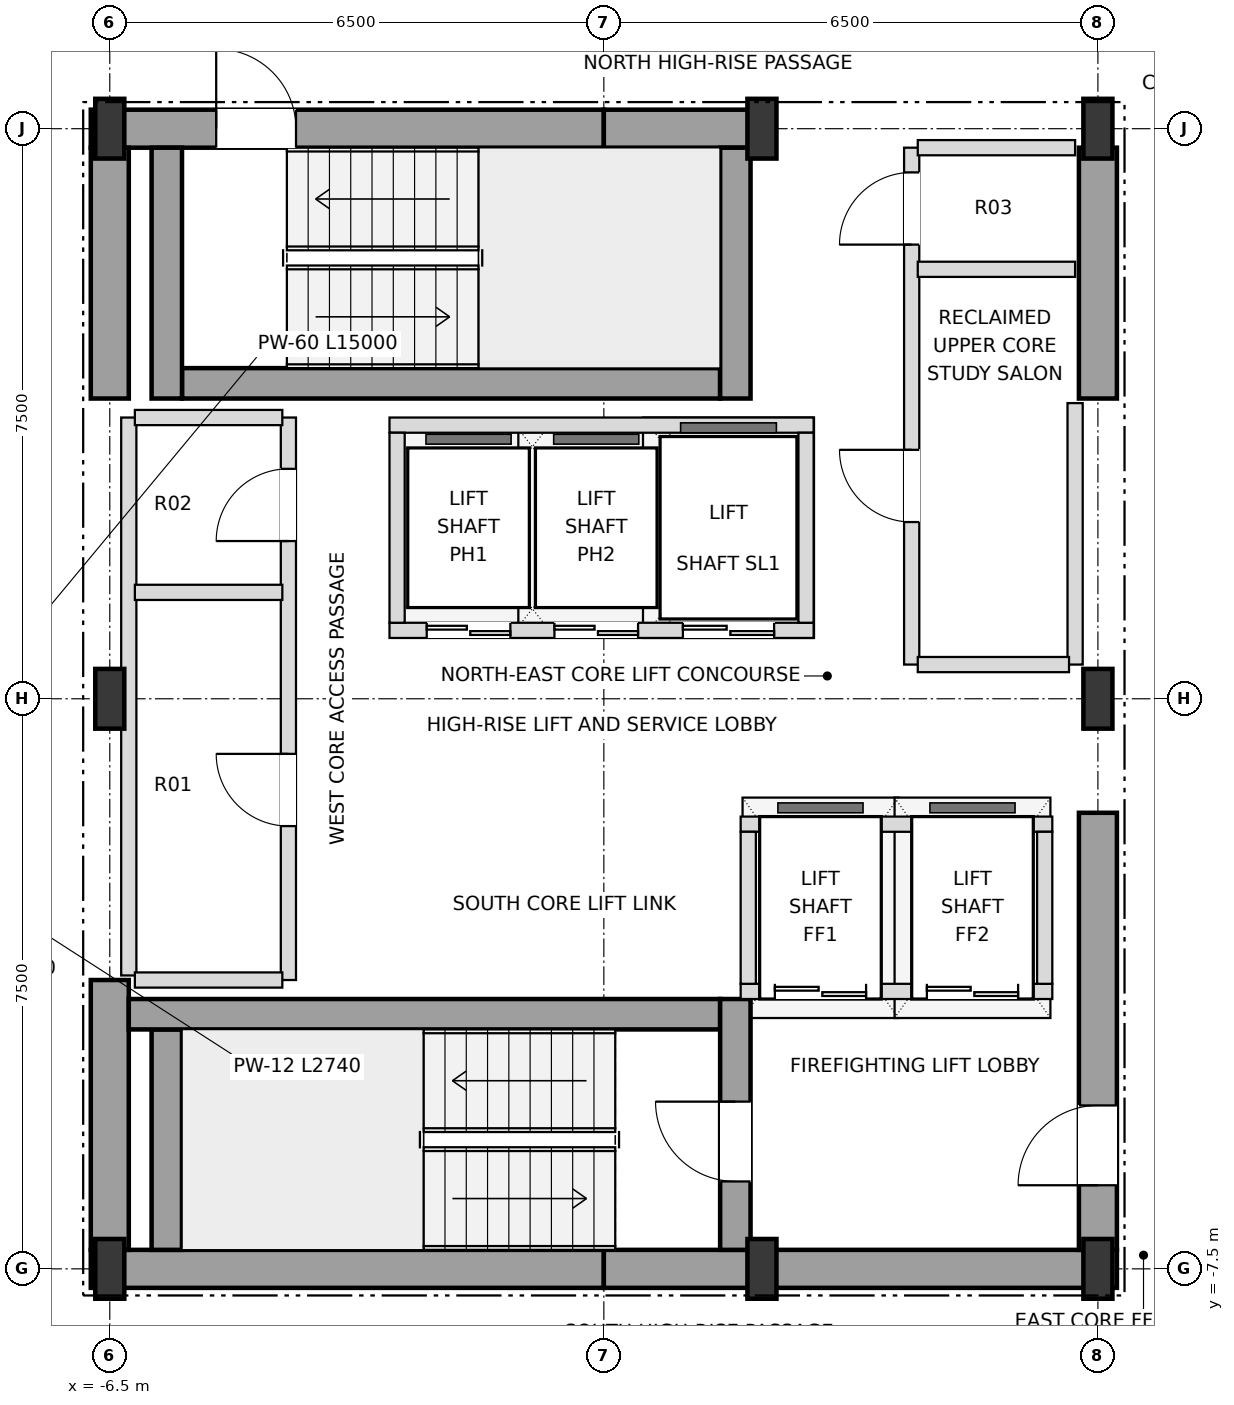
"""IFC4 building model, lengths in metres.
Left out: names, types, materials, properties, quantities, classifications, styles, units other than length and angle.
Written with IfcOpenShell. Run it as: python <this file> out.ifc"""

import sys

from ifc_helpers import new_model, si_unit, direction, frame, frame_2d, origin, origin_2d, place, context, subcontext, project, spatial, rectangle, i_section, extrude, element, fill, save


model = new_model("IFC4")
c1 = context("Model", 3, precision=1e-05, world=origin(), true_north=direction((0.0, 1.0)))
c2 = subcontext(c1, "Body", "Model", "MODEL_VIEW")
j1 = project(units=[si_unit("LENGTHUNIT", "METRE"), si_unit("PLANEANGLEUNIT", "RADIAN")], contexts=[c1])
p1 = place(None, origin())
s1 = spatial("IfcSite", under=j1, at=p1, CompositionType="ELEMENT")
p2 = place(p1, origin())
s2 = spatial("IfcBuilding", under=s1, at=p2, CompositionType="ELEMENT")
p3 = place(p2, frame((0.0, 0.0, 290.7)))
s3 = spatial("IfcBuildingStorey", under=s2, at=p3, CompositionType="ELEMENT", Elevation=290.7)
for number, where, z_axis, x_axis in (
    (1, (-6.5, -7.5, 0.0), (0.0, 0.0, 1.0), (1.0, 0.0, 0.0)),
    (2, (2.08, -7.5, 0.0), (0.0, 0.0, 1.0), (1.0, 0.0, 0.0)),
    (3, (6.5, -7.5, 0.0), (0.0, 0.0, 1.0), (1.0, 0.0, 0.0)),
    (4, (-6.5, 0.0, 0.0), (0.0, 0.0, 1.0), (1.0, 0.0, 0.0)),
    (5, (6.5, 0.0, 0.0), (0.0, 0.0, 1.0), (1.0, 0.0, 0.0)),
    (6, (-6.5, 7.5, 0.0), (0.0, 0.0, 1.0), (1.0, 0.0, 0.0)),
    (7, (2.08, 7.5, 0.0), (0.0, 0.0, 1.0), (1.0, 0.0, 0.0)),
    (8, (6.5, 7.5, 0.0), (0.0, 0.0, 1.0), (1.0, 0.0, 0.0)),
):
    element("IfcColumn", number, at=place(p3, frame(where, z_axis=z_axis, x_axis=x_axis)), inside=s3, PredefinedType="COLUMN", context=c2, shape_type="SweptSolid", body=[
        extrude(i_section(OverallWidth=0.382, OverallDepth=0.786, WebThickness=0.02, FlangeThickness=0.033, at=origin_2d()), origin(), (0.0, 0.0, 1.0), 3.6),
    ])
for number, where, z_axis, x_axis in (
    (9, (-6.75, -7.5, 0.0), (0.0, 0.0, 1.0), (1.0, 0.0, 0.0)),
    (10, (0.0, -7.5, 0.0), (0.0, 0.0, 1.0), (1.0, 0.0, 0.0)),
):
    element("IfcWall", number, at=place(p3, frame(where, z_axis=z_axis, x_axis=x_axis)), inside=s3, PredefinedType="SHEAR", context=c2, shape_type="SweptSolid", body=[
        extrude(rectangle(XDim=6.75, YDim=0.5, at=frame_2d((3.375, 0.0))), origin(), (0.0, 0.0, 1.0), 3.38),
    ])
p4 = place(p3, frame((-6.75, 7.5, 0.0), z_axis=(0.0, 0.0, 1.0), x_axis=(1.0, 0.0, 0.0)))
e11 = element("IfcWall", 11, at=p4, inside=s3, PredefinedType="SHEAR", context=c2, shape_type="SweptSolid", body=[
    extrude(rectangle(XDim=6.75, YDim=0.5, at=frame_2d((3.375, 0.0))), origin(), (0.0, 0.0, 1.0), 3.38),
])
p5 = place(p4, frame((1.65, 0.0, 0.0)))
e12 = element("IfcOpeningElement", 12, at=p5, cuts=e11, PredefinedType="OPENING", context=c2, shape_type="SweptSolid", body=[
    extrude(rectangle(XDim=1.05, YDim=2.15, at=frame_2d((0.525, 1.075))), frame((0.0, 0.26, 0.0), z_axis=(0.0, -1.0, 0.0), x_axis=(1.0, 0.0, 0.0)), (0.0, 0.0, 1.0), 0.52),
])
p6 = place(p3, frame((0.0, 7.5, 0.0), z_axis=(0.0, 0.0, 1.0), x_axis=(1.0, 0.0, 0.0)))
e13 = element("IfcWall", 13, at=p6, inside=s3, PredefinedType="SHEAR", context=c2, shape_type="SweptSolid", body=[
    extrude(rectangle(XDim=2.08, YDim=0.5, at=frame_2d((1.04, 0.0))), origin(), (0.0, 0.0, 1.0), 3.38),
])
p7 = place(p3, frame((-6.5, -7.25, 0.0), z_axis=(0.0, 0.0, 1.0), x_axis=(0.0, 1.0, 0.0)))
e14 = element("IfcWall", 14, at=p7, inside=s3, PredefinedType="SHEAR", context=c2, shape_type="SweptSolid", body=[
    extrude(rectangle(XDim=3.55, YDim=0.5, at=frame_2d((1.775, 0.0))), origin(), (0.0, 0.0, 1.0), 3.38),
])
p8 = place(p3, frame((-6.5, 3.95, 0.0), z_axis=(0.0, 0.0, 1.0), x_axis=(0.0, 1.0, 0.0)))
e15 = element("IfcWall", 15, at=p8, inside=s3, PredefinedType="SHEAR", context=c2, shape_type="SweptSolid", body=[
    extrude(rectangle(XDim=3.3, YDim=0.5, at=frame_2d((1.65, 0.0))), origin(), (0.0, 0.0, 1.0), 3.38),
])
p9 = place(p3, frame((6.5, -7.25, 0.0), z_axis=(0.0, 0.0, 1.0), x_axis=(0.0, 1.0, 0.0)))
e16 = element("IfcWall", 16, at=p9, inside=s3, PredefinedType="SHEAR", context=c2, shape_type="SweptSolid", body=[
    extrude(rectangle(XDim=5.75, YDim=0.5, at=frame_2d((2.875, 0.0))), origin(), (0.0, 0.0, 1.0), 3.38),
])
p10 = place(p9, frame((0.85, 0.0, 0.0)))
e17 = element("IfcOpeningElement", 17, at=p10, cuts=e16, PredefinedType="OPENING", context=c2, shape_type="SweptSolid", body=[
    extrude(rectangle(XDim=1.05, YDim=2.15, at=frame_2d((0.525, 1.075))), frame((0.0, 0.26, 0.0), z_axis=(0.0, -1.0, 0.0), x_axis=(1.0, 0.0, 0.0)), (0.0, 0.0, 1.0), 0.52),
])
p11 = place(p3, frame((6.5, 3.95, 0.0), z_axis=(0.0, 0.0, 1.0), x_axis=(0.0, 1.0, 0.0)))
e18 = element("IfcWall", 18, at=p11, inside=s3, PredefinedType="SHEAR", context=c2, shape_type="SweptSolid", body=[
    extrude(rectangle(XDim=3.3, YDim=0.5, at=frame_2d((1.65, 0.0))), origin(), (0.0, 0.0, 1.0), 3.38),
])
p12 = place(p3, frame((-5.75, -7.25, 0.0), z_axis=(0.0, 0.0, 1.0), x_axis=(0.0, 1.0, 0.0)))
e19 = element("IfcWall", 19, at=p12, inside=s3, PredefinedType="SHEAR", context=c2, shape_type="SweptSolid", body=[
    extrude(rectangle(XDim=2.9, YDim=0.4, at=frame_2d((1.45, 0.0))), origin(), (0.0, 0.0, 1.0), 3.38),
])
p13 = place(p3, frame((-6.25, -4.15, 0.0), z_axis=(0.0, 0.0, 1.0), x_axis=(1.0, 0.0, 0.0)))
e20 = element("IfcWall", 20, at=p13, inside=s3, PredefinedType="SHEAR", context=c2, shape_type="SweptSolid", body=[
    extrude(rectangle(XDim=7.78, YDim=0.4, at=frame_2d((3.89, 0.0))), origin(), (0.0, 0.0, 1.0), 3.38),
])
p14 = place(p3, frame((1.73, -7.25, 0.0), z_axis=(0.0, 0.0, 1.0), x_axis=(0.0, 1.0, 0.0)))
e21 = element("IfcWall", 21, at=p14, inside=s3, PredefinedType="SHEAR", context=c2, shape_type="SweptSolid", body=[
    extrude(rectangle(XDim=3.3, YDim=0.4, at=frame_2d((1.65, 0.0))), origin(), (0.0, 0.0, 1.0), 3.38),
])
p15 = place(p14, frame((0.9, 0.0, 0.0)))
e22 = element("IfcOpeningElement", 22, at=p15, cuts=e21, PredefinedType="OPENING", context=c2, shape_type="SweptSolid", body=[
    extrude(rectangle(XDim=1.05, YDim=2.15, at=frame_2d((0.525, 1.075))), frame((0.0, 0.21, 0.0), z_axis=(0.0, -1.0, 0.0), x_axis=(1.0, 0.0, 0.0)), (0.0, 0.0, 1.0), 0.42),
])
p16 = place(p3, frame((-5.55, 4.15, 0.0), z_axis=(0.0, 0.0, 1.0), x_axis=(1.0, 0.0, 0.0)))
e23 = element("IfcWall", 23, at=p16, inside=s3, PredefinedType="SHEAR", context=c2, shape_type="SweptSolid", body=[
    extrude(rectangle(XDim=7.08, YDim=0.4, at=frame_2d((3.54, 0.0))), origin(), (0.0, 0.0, 1.0), 3.38),
])
for number, where, z_axis, x_axis in (
    (24, (1.73, 3.95, 0.0), (0.0, 0.0, 1.0), (0.0, 1.0, 0.0)),
    (25, (-5.75, 3.95, 0.0), (0.0, 0.0, 1.0), (0.0, 1.0, 0.0)),
):
    element("IfcWall", number, at=place(p3, frame(where, z_axis=z_axis, x_axis=x_axis)), inside=s3, PredefinedType="SHEAR", context=c2, shape_type="SweptSolid", body=[
        extrude(rectangle(XDim=3.3, YDim=0.4, at=frame_2d((1.65, 0.0))), origin(), (0.0, 0.0, 1.0), 3.38),
    ])
p17 = place(p3, frame((-2.82, 0.9, 0.0), z_axis=(0.0, 0.0, 1.0), x_axis=(1.0, 0.0, 0.0)))
e26 = element("IfcWall", 26, at=p17, inside=s3, PredefinedType="SOLIDWALL", context=c2, shape_type="SweptSolid", body=[
    extrude(rectangle(XDim=5.58, YDim=0.2, at=frame_2d((2.79, 0.0))), origin(), (0.0, 0.0, 1.0), 3.38),
])
p18 = place(p17, frame((0.49, 0.0, 0.0)))
e27 = element("IfcOpeningElement", 27, at=p18, cuts=e26, PredefinedType="OPENING", context=c2, shape_type="SweptSolid", body=[
    extrude(rectangle(XDim=1.1, YDim=2.15, at=frame_2d((0.55, 1.075))), frame((0.0, 0.11, 0.0), z_axis=(0.0, -1.0, 0.0), x_axis=(1.0, 0.0, 0.0)), (0.0, 0.0, 1.0), 0.22),
])
p19 = place(p17, frame((2.17, 0.0, 0.0)))
e28 = element("IfcOpeningElement", 28, at=p19, cuts=e26, PredefinedType="OPENING", context=c2, shape_type="SweptSolid", body=[
    extrude(rectangle(XDim=1.1, YDim=2.15, at=frame_2d((0.55, 1.075))), frame((0.0, 0.11, 0.0), z_axis=(0.0, -1.0, 0.0), x_axis=(1.0, 0.0, 0.0)), (0.0, 0.0, 1.0), 0.22),
])
p20 = place(p17, frame((3.86, 0.0, 0.0)))
e29 = element("IfcOpeningElement", 29, at=p20, cuts=e26, PredefinedType="OPENING", context=c2, shape_type="SweptSolid", body=[
    extrude(rectangle(XDim=1.2, YDim=2.2, at=frame_2d((0.6, 1.1))), frame((0.0, 0.11, 0.0), z_axis=(0.0, -1.0, 0.0), x_axis=(1.0, 0.0, 0.0)), (0.0, 0.0, 1.0), 0.22),
])
p21 = place(p3, frame((-2.82, 3.6, 0.0), z_axis=(0.0, 0.0, 1.0), x_axis=(1.0, 0.0, 0.0)))
e30 = element("IfcWall", 30, at=p21, inside=s3, PredefinedType="SOLIDWALL", context=c2, shape_type="SweptSolid", body=[
    extrude(rectangle(XDim=5.58, YDim=0.2, at=frame_2d((2.79, 0.0))), origin(), (0.0, 0.0, 1.0), 3.38),
])
for number, where, z_axis, x_axis in (
    (31, (-2.72, 1.0, 0.0), (0.0, 0.0, 1.0), (0.0, 1.0, 0.0)),
    (32, (2.66, 1.0, 0.0), (0.0, 0.0, 1.0), (0.0, 1.0, 0.0)),
):
    element("IfcWall", number, at=place(p3, frame(where, z_axis=z_axis, x_axis=x_axis)), inside=s3, PredefinedType="SOLIDWALL", context=c2, shape_type="SweptSolid", body=[
        extrude(rectangle(XDim=2.5, YDim=0.2, at=frame_2d((1.25, 0.0))), origin(), (0.0, 0.0, 1.0), 3.38),
    ])
p22 = place(p3, frame((1.8, -3.85, 0.0), z_axis=(0.0, 0.0, 1.0), x_axis=(1.0, 0.0, 0.0)))
e33 = element("IfcWall", 33, at=p22, inside=s3, PredefinedType="SOLIDWALL", context=c2, shape_type="SweptSolid", body=[
    extrude(rectangle(XDim=4.1, YDim=0.2, at=frame_2d((2.05, 0.0))), origin(), (0.0, 0.0, 1.0), 3.38),
])
p23 = place(p22, frame((0.45, 0.0, 0.0)))
e34 = element("IfcOpeningElement", 34, at=p23, cuts=e33, PredefinedType="OPENING", context=c2, shape_type="SweptSolid", body=[
    extrude(rectangle(XDim=1.2, YDim=2.2, at=frame_2d((0.6, 1.1))), frame((0.0, 0.11, 0.0), z_axis=(0.0, -1.0, 0.0), x_axis=(1.0, 0.0, 0.0)), (0.0, 0.0, 1.0), 0.22),
])
p24 = place(p22, frame((2.45, 0.0, 0.0)))
e35 = element("IfcOpeningElement", 35, at=p24, cuts=e33, PredefinedType="OPENING", context=c2, shape_type="SweptSolid", body=[
    extrude(rectangle(XDim=1.2, YDim=2.2, at=frame_2d((0.6, 1.1))), frame((0.0, 0.11, 0.0), z_axis=(0.0, -1.0, 0.0), x_axis=(1.0, 0.0, 0.0)), (0.0, 0.0, 1.0), 0.22),
])
p25 = place(p3, frame((1.8, -1.65, 0.0), z_axis=(0.0, 0.0, 1.0), x_axis=(1.0, 0.0, 0.0)))
e36 = element("IfcWall", 36, at=p25, inside=s3, PredefinedType="SOLIDWALL", context=c2, shape_type="SweptSolid", body=[
    extrude(rectangle(XDim=4.1, YDim=0.2, at=frame_2d((2.05, 0.0))), origin(), (0.0, 0.0, 1.0), 3.38),
])
for number, where, z_axis, x_axis in (
    (37, (1.9, -3.75, 0.0), (0.0, 0.0, 1.0), (0.0, 1.0, 0.0)),
    (38, (5.8, -3.75, 0.0), (0.0, 0.0, 1.0), (0.0, 1.0, 0.0)),
):
    element("IfcWall", number, at=place(p3, frame(where, z_axis=z_axis, x_axis=x_axis)), inside=s3, PredefinedType="SOLIDWALL", context=c2, shape_type="SweptSolid", body=[
        extrude(rectangle(XDim=2.0, YDim=0.2, at=frame_2d((1.0, 0.0))), origin(), (0.0, 0.0, 1.0), 3.38),
    ])
p26 = place(p3, frame((-6.25, -3.64, 0.0), z_axis=(0.0, 0.0, 1.0), x_axis=(0.0, 1.0, 0.0)))
e39 = element("IfcWall", 39, at=p26, inside=s3, PredefinedType="SOLIDWALL", context=c2, shape_type="SweptSolid", body=[
    extrude(rectangle(XDim=7.34, YDim=0.2, at=frame_2d((3.67, 0.0))), origin(), (0.0, 0.0, 1.0), 3.38),
])
p27 = place(p3, frame((-4.15, -3.7, 0.0), z_axis=(0.0, 0.0, 1.0), x_axis=(0.0, 1.0, 0.0)))
e40 = element("IfcWall", 40, at=p27, inside=s3, PredefinedType="SOLIDWALL", context=c2, shape_type="SweptSolid", body=[
    extrude(rectangle(XDim=7.4, YDim=0.2, at=frame_2d((3.7, 0.0))), origin(), (0.0, 0.0, 1.0), 3.38),
])
p28 = place(p27, frame((2.025, 0.0, 0.0)))
e41 = element("IfcOpeningElement", 41, at=p28, cuts=e40, PredefinedType="OPENING", context=c2, shape_type="SweptSolid", body=[
    extrude(rectangle(XDim=0.95, YDim=2.15, at=frame_2d((0.475, 1.075))), frame((0.0, 0.11, 0.0), z_axis=(0.0, -1.0, 0.0), x_axis=(1.0, 0.0, 0.0)), (0.0, 0.0, 1.0), 0.22),
])
p29 = place(p27, frame((5.775, 0.0, 0.0)))
e42 = element("IfcOpeningElement", 42, at=p29, cuts=e40, PredefinedType="OPENING", context=c2, shape_type="SweptSolid", body=[
    extrude(rectangle(XDim=0.95, YDim=2.15, at=frame_2d((0.475, 1.075))), frame((0.0, 0.11, 0.0), z_axis=(0.0, -1.0, 0.0), x_axis=(1.0, 0.0, 0.0)), (0.0, 0.0, 1.0), 0.22),
])
p30 = place(p3, frame((4.05, 0.45, 0.0), z_axis=(0.0, 0.0, 1.0), x_axis=(0.0, 1.0, 0.0)))
e43 = element("IfcWall", 43, at=p30, inside=s3, PredefinedType="SOLIDWALL", context=c2, shape_type="SweptSolid", body=[
    extrude(rectangle(XDim=6.8, YDim=0.2, at=frame_2d((3.4, 0.0))), origin(), (0.0, 0.0, 1.0), 3.38),
])
p31 = place(p30, frame((1.875, 0.0, 0.0)))
e44 = element("IfcOpeningElement", 44, at=p31, cuts=e43, PredefinedType="OPENING", context=c2, shape_type="SweptSolid", body=[
    extrude(rectangle(XDim=0.95, YDim=2.15, at=frame_2d((0.475, 1.075))), frame((0.0, 0.11, 0.0), z_axis=(0.0, -1.0, 0.0), x_axis=(1.0, 0.0, 0.0)), (0.0, 0.0, 1.0), 0.22),
])
p32 = place(p30, frame((5.525, 0.0, 0.0)))
e45 = element("IfcOpeningElement", 45, at=p32, cuts=e43, PredefinedType="OPENING", context=c2, shape_type="SweptSolid", body=[
    extrude(rectangle(XDim=0.95, YDim=2.15, at=frame_2d((0.475, 1.075))), frame((0.0, 0.11, 0.0), z_axis=(0.0, -1.0, 0.0), x_axis=(1.0, 0.0, 0.0)), (0.0, 0.0, 1.0), 0.22),
])
p33 = place(p3, frame((6.2, 0.45, 0.0), z_axis=(0.0, 0.0, 1.0), x_axis=(0.0, 1.0, 0.0)))
e46 = element("IfcWall", 46, at=p33, inside=s3, PredefinedType="SOLIDWALL", context=c2, shape_type="SweptSolid", body=[
    extrude(rectangle(XDim=3.44, YDim=0.2, at=frame_2d((1.72, 0.0))), origin(), (0.0, 0.0, 1.0), 3.38),
])
p34 = place(p3, frame((-6.17, -3.7, 0.0), z_axis=(0.0, 0.0, 1.0), x_axis=(1.0, 0.0, 0.0)))
e47 = element("IfcWall", 47, at=p34, inside=s3, PredefinedType="SOLIDWALL", context=c2, shape_type="SweptSolid", body=[
    extrude(rectangle(XDim=1.94, YDim=0.2, at=frame_2d((0.97, 0.0))), origin(), (0.0, 0.0, 1.0), 3.38),
])
p35 = place(p3, frame((4.13, 0.45, 0.0), z_axis=(0.0, 0.0, 1.0), x_axis=(1.0, 0.0, 0.0)))
e48 = element("IfcWall", 48, at=p35, inside=s3, PredefinedType="SOLIDWALL", context=c2, shape_type="SweptSolid", body=[
    extrude(rectangle(XDim=1.99, YDim=0.2, at=frame_2d((0.995, 0.0))), origin(), (0.0, 0.0, 1.0), 3.38),
])
for number, where, z_axis, x_axis in (
    (49, (-6.17, 1.4, 0.0), (0.0, 0.0, 1.0), (1.0, 0.0, 0.0)),
    (50, (-6.17, 3.7, 0.0), (0.0, 0.0, 1.0), (1.0, 0.0, 0.0)),
):
    element("IfcWall", number, at=place(p3, frame(where, z_axis=z_axis, x_axis=x_axis)), inside=s3, PredefinedType="SOLIDWALL", context=c2, shape_type="SweptSolid", body=[
        extrude(rectangle(XDim=1.94, YDim=0.2, at=frame_2d((0.97, 0.0))), origin(), (0.0, 0.0, 1.0), 3.38),
    ])
for number, where, z_axis, x_axis in (
    (51, (4.13, 5.65, 0.0), (0.0, 0.0, 1.0), (1.0, 0.0, 0.0)),
    (52, (4.13, 7.25, 0.0), (0.0, 0.0, 1.0), (1.0, 0.0, 0.0)),
):
    element("IfcWall", number, at=place(p3, frame(where, z_axis=z_axis, x_axis=x_axis)), inside=s3, PredefinedType="SOLIDWALL", context=c2, shape_type="SweptSolid", body=[
        extrude(rectangle(XDim=2.07, YDim=0.2, at=frame_2d((1.035, 0.0))), origin(), (0.0, 0.0, 1.0), 3.38),
    ])
p36 = place(p10, origin())
e53 = element("IfcDoor", 53, at=p36, inside=s3, OperationType="SINGLE_SWING_LEFT", PredefinedType="DOOR", context=c2, shape_type="SweptSolid", body=[
    extrude(rectangle(XDim=1.05, YDim=2.15, at=frame_2d((0.525, 1.075))), frame((0.0, 0.025, 0.0), z_axis=(0.0, -1.0, 0.0), x_axis=(1.0, 0.0, 0.0)), (0.0, 0.0, 1.0), 0.05),
])
fill(e17, e53)
p37 = place(p15, origin())
e54 = element("IfcDoor", 54, at=p37, inside=s3, OperationType="SINGLE_SWING_RIGHT", PredefinedType="DOOR", context=c2, shape_type="SweptSolid", body=[
    extrude(rectangle(XDim=1.05, YDim=2.15, at=frame_2d((0.525, 1.075))), frame((0.0, 0.025, 0.0), z_axis=(0.0, -1.0, 0.0), x_axis=(1.0, 0.0, 0.0)), (0.0, 0.0, 1.0), 0.05),
])
fill(e22, e54)
p38 = place(p5, origin())
e55 = element("IfcDoor", 55, at=p38, inside=s3, OperationType="SINGLE_SWING_LEFT", PredefinedType="DOOR", context=c2, shape_type="SweptSolid", body=[
    extrude(rectangle(XDim=1.05, YDim=2.15, at=frame_2d((0.525, 1.075))), frame((0.0, 0.025, 0.0), z_axis=(0.0, -1.0, 0.0), x_axis=(1.0, 0.0, 0.0)), (0.0, 0.0, 1.0), 0.05),
])
fill(e12, e55)
p39 = place(p18, origin())
e56 = element("IfcDoor", 56, at=p39, inside=s3, OperationType="DOUBLE_DOOR_SLIDING", PredefinedType="DOOR", context=c2, shape_type="SweptSolid", body=[
    extrude(rectangle(XDim=1.1, YDim=2.15, at=frame_2d((0.55, 1.075))), frame((0.0, 0.025, 0.0), z_axis=(0.0, -1.0, 0.0), x_axis=(1.0, 0.0, 0.0)), (0.0, 0.0, 1.0), 0.05),
])
fill(e27, e56)
p40 = place(p19, origin())
e57 = element("IfcDoor", 57, at=p40, inside=s3, OperationType="DOUBLE_DOOR_SLIDING", PredefinedType="DOOR", context=c2, shape_type="SweptSolid", body=[
    extrude(rectangle(XDim=1.1, YDim=2.15, at=frame_2d((0.55, 1.075))), frame((0.0, 0.025, 0.0), z_axis=(0.0, -1.0, 0.0), x_axis=(1.0, 0.0, 0.0)), (0.0, 0.0, 1.0), 0.05),
])
fill(e28, e57)
p41 = place(p20, origin())
e58 = element("IfcDoor", 58, at=p41, inside=s3, OperationType="DOUBLE_DOOR_SLIDING", PredefinedType="DOOR", context=c2, shape_type="SweptSolid", body=[
    extrude(rectangle(XDim=1.2, YDim=2.2, at=frame_2d((0.6, 1.1))), frame((0.0, 0.025, 0.0), z_axis=(0.0, -1.0, 0.0), x_axis=(1.0, 0.0, 0.0)), (0.0, 0.0, 1.0), 0.05),
])
fill(e29, e58)
p42 = place(p23, origin())
e59 = element("IfcDoor", 59, at=p42, inside=s3, OperationType="DOUBLE_DOOR_SLIDING", PredefinedType="DOOR", context=c2, shape_type="SweptSolid", body=[
    extrude(rectangle(XDim=1.2, YDim=2.2, at=frame_2d((0.6, 1.1))), frame((0.0, 0.025, 0.0), z_axis=(0.0, -1.0, 0.0), x_axis=(1.0, 0.0, 0.0)), (0.0, 0.0, 1.0), 0.05),
])
fill(e34, e59)
p43 = place(p24, origin())
e60 = element("IfcDoor", 60, at=p43, inside=s3, OperationType="DOUBLE_DOOR_SLIDING", PredefinedType="DOOR", context=c2, shape_type="SweptSolid", body=[
    extrude(rectangle(XDim=1.2, YDim=2.2, at=frame_2d((0.6, 1.1))), frame((0.0, 0.025, 0.0), z_axis=(0.0, -1.0, 0.0), x_axis=(1.0, 0.0, 0.0)), (0.0, 0.0, 1.0), 0.05),
])
fill(e35, e60)
p44 = place(p28, origin())
e61 = element("IfcDoor", 61, at=p44, inside=s3, OperationType="SINGLE_SWING_RIGHT", PredefinedType="DOOR", context=c2, shape_type="SweptSolid", body=[
    extrude(rectangle(XDim=0.95, YDim=2.15, at=frame_2d((0.475, 1.075))), frame((0.0, 0.025, 0.0), z_axis=(0.0, -1.0, 0.0), x_axis=(1.0, 0.0, 0.0)), (0.0, 0.0, 1.0), 0.05),
])
fill(e41, e61)
p45 = place(p29, origin())
e62 = element("IfcDoor", 62, at=p45, inside=s3, OperationType="SINGLE_SWING_LEFT", PredefinedType="DOOR", context=c2, shape_type="SweptSolid", body=[
    extrude(rectangle(XDim=0.95, YDim=2.15, at=frame_2d((0.475, 1.075))), frame((0.0, 0.025, 0.0), z_axis=(0.0, -1.0, 0.0), x_axis=(1.0, 0.0, 0.0)), (0.0, 0.0, 1.0), 0.05),
])
fill(e42, e62)
p46 = place(p31, origin())
e63 = element("IfcDoor", 63, at=p46, inside=s3, OperationType="SINGLE_SWING_RIGHT", PredefinedType="DOOR", context=c2, shape_type="SweptSolid", body=[
    extrude(rectangle(XDim=0.95, YDim=2.15, at=frame_2d((0.475, 1.075))), frame((0.0, 0.025, 0.0), z_axis=(0.0, -1.0, 0.0), x_axis=(1.0, 0.0, 0.0)), (0.0, 0.0, 1.0), 0.05),
])
fill(e44, e63)
p47 = place(p32, origin())
e64 = element("IfcDoor", 64, at=p47, inside=s3, OperationType="SINGLE_SWING_LEFT", PredefinedType="DOOR", context=c2, shape_type="SweptSolid", body=[
    extrude(rectangle(XDim=0.95, YDim=2.15, at=frame_2d((0.475, 1.075))), frame((0.0, 0.025, 0.0), z_axis=(0.0, -1.0, 0.0), x_axis=(1.0, 0.0, 0.0)), (0.0, 0.0, 1.0), 0.05),
])
fill(e45, e64)
save(model, sys.argv[1])
